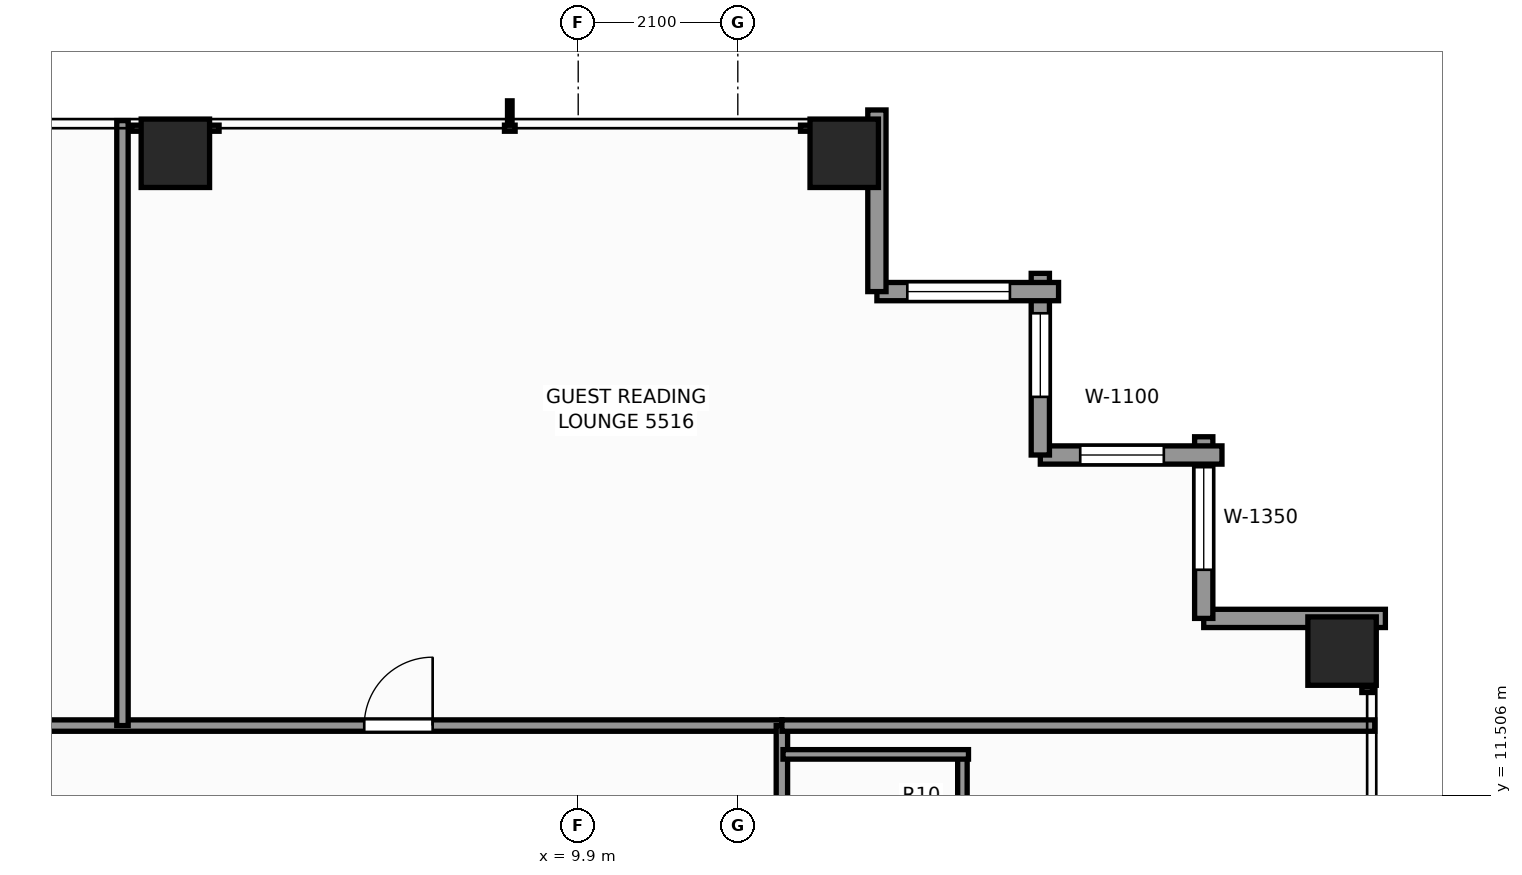
"""IFC4 building model, lengths in metres.
Left out: names, types, materials, properties, quantities, classifications, styles, units other than length and angle.
Written with IfcOpenShell. Run it as: python <this file> out.ifc"""

import sys

from ifc_helpers import new_model, si_unit, direction, frame, frame_2d, origin, origin_2d, place, context, subcontext, project, spatial, rectangle, extrude, element, fill, save


model = new_model("IFC4")
c1 = context("Model", 3, precision=1e-05, world=origin(), true_north=direction((0.0, 1.0)))
c2 = subcontext(c1, "Body", "Model", "MODEL_VIEW")
j1 = project(units=[si_unit("LENGTHUNIT", "METRE"), si_unit("PLANEANGLEUNIT", "RADIAN")], contexts=[c1])
p1 = place(None, origin())
s1 = spatial("IfcSite", under=j1, at=p1, CompositionType="ELEMENT")
p2 = place(p1, origin())
s2 = spatial("IfcBuilding", under=s1, at=p2, CompositionType="ELEMENT")
p3 = place(p2, frame((0.0, 0.0, 189.9)))
s3 = spatial("IfcBuildingStorey", under=s2, at=p3, CompositionType="ELEMENT", Elevation=189.9)
for number, where, z_axis, x_axis in (
    (1, (4.6, 19.95, 0.0), (0.0, 0.0, 1.0), (1.0, 0.0, 0.0)),
    (2, (13.4, 19.95, 0.0), (0.0, 0.0, 1.0), (1.0, 0.0, 0.0)),
    (3, (19.95, 13.4, 0.0), (0.0, 0.0, 1.0), (1.0, 0.0, 0.0)),
):
    element("IfcColumn", number, at=place(p3, frame(where, z_axis=z_axis, x_axis=x_axis)), inside=s3, PredefinedType="COLUMN", context=c2, shape_type="SweptSolid", body=[
        extrude(rectangle(XDim=0.9, YDim=0.9, at=origin_2d()), origin(), (0.0, 0.0, 1.0), 3.3),
    ])
p4 = place(p3, frame((18.13, 13.83, 0.0), z_axis=(0.0, 0.0, 1.0), x_axis=(1.0, 0.0, 0.0)))
e4 = element("IfcWall", 4, at=p4, inside=s3, PredefinedType="STANDARD", context=c2, shape_type="SweptSolid", body=[
    extrude(rectangle(XDim=2.39, YDim=0.24, at=frame_2d((1.195, 0.0))), origin(), (0.0, 0.0, 1.0), 2.463),
])
p5 = place(p3, frame((18.13, 16.22, 0.0), z_axis=(0.0, 0.0, 1.0), x_axis=(0.0, -1.0, 0.0)))
e5 = element("IfcWall", 5, at=p5, inside=s3, PredefinedType="STANDARD", context=c2, shape_type="SweptSolid", body=[
    extrude(rectangle(XDim=2.39, YDim=0.24, at=frame_2d((1.195, 0.0))), origin(), (0.0, 0.0, 1.0), 2.463),
])
p6 = place(p5, frame((0.4, 0.0, 0.65)))
e6 = element("IfcOpeningElement", 6, at=p6, cuts=e5, PredefinedType="OPENING", context=c2, shape_type="SweptSolid", body=[
    extrude(rectangle(XDim=1.35, YDim=1.55, at=frame_2d((0.675, 0.775))), frame((0.0, 0.13, 0.0), z_axis=(0.0, -1.0, 0.0), x_axis=(1.0, 0.0, 0.0)), (0.0, 0.0, 1.0), 0.26),
])
p7 = place(p3, frame((15.98, 15.98, 0.0), z_axis=(0.0, 0.0, 1.0), x_axis=(1.0, 0.0, 0.0)))
e7 = element("IfcWall", 7, at=p7, inside=s3, PredefinedType="STANDARD", context=c2, shape_type="SweptSolid", body=[
    extrude(rectangle(XDim=2.39, YDim=0.24, at=frame_2d((1.195, 0.0))), origin(), (0.0, 0.0, 1.0), 2.463),
])
p8 = place(p7, frame((0.525, 0.0, 0.65)))
e8 = element("IfcOpeningElement", 8, at=p8, cuts=e7, PredefinedType="OPENING", context=c2, shape_type="SweptSolid", body=[
    extrude(rectangle(XDim=1.1, YDim=1.45, at=frame_2d((0.55, 0.725))), frame((0.0, 0.13, 0.0), z_axis=(0.0, -1.0, 0.0), x_axis=(1.0, 0.0, 0.0)), (0.0, 0.0, 1.0), 0.26),
])
p9 = place(p3, frame((15.98, 18.37, 0.0), z_axis=(0.0, 0.0, 1.0), x_axis=(0.0, -1.0, 0.0)))
e9 = element("IfcWall", 9, at=p9, inside=s3, PredefinedType="STANDARD", context=c2, shape_type="SweptSolid", body=[
    extrude(rectangle(XDim=2.39, YDim=0.24, at=frame_2d((1.195, 0.0))), origin(), (0.0, 0.0, 1.0), 2.463),
])
p10 = place(p9, frame((0.525, 0.0, 0.65)))
e10 = element("IfcOpeningElement", 10, at=p10, cuts=e9, PredefinedType="OPENING", context=c2, shape_type="SweptSolid", body=[
    extrude(rectangle(XDim=1.1, YDim=1.45, at=frame_2d((0.55, 0.725))), frame((0.0, 0.13, 0.0), z_axis=(0.0, -1.0, 0.0), x_axis=(1.0, 0.0, 0.0)), (0.0, 0.0, 1.0), 0.26),
])
p11 = place(p3, frame((13.83, 18.13, 0.0), z_axis=(0.0, 0.0, 1.0), x_axis=(1.0, 0.0, 0.0)))
e11 = element("IfcWall", 11, at=p11, inside=s3, PredefinedType="STANDARD", context=c2, shape_type="SweptSolid", body=[
    extrude(rectangle(XDim=2.39, YDim=0.24, at=frame_2d((1.195, 0.0))), origin(), (0.0, 0.0, 1.0), 2.463),
])
p12 = place(p11, frame((0.4, 0.0, 0.65)))
e12 = element("IfcOpeningElement", 12, at=p12, cuts=e11, PredefinedType="OPENING", context=c2, shape_type="SweptSolid", body=[
    extrude(rectangle(XDim=1.35, YDim=1.55, at=frame_2d((0.675, 0.775))), frame((0.0, 0.13, 0.0), z_axis=(0.0, -1.0, 0.0), x_axis=(1.0, 0.0, 0.0)), (0.0, 0.0, 1.0), 0.26),
])
p13 = place(p3, frame((13.83, 20.52, 0.0), z_axis=(0.0, 0.0, 1.0), x_axis=(0.0, -1.0, 0.0)))
e13 = element("IfcWall", 13, at=p13, inside=s3, PredefinedType="STANDARD", context=c2, shape_type="SweptSolid", body=[
    extrude(rectangle(XDim=2.39, YDim=0.24, at=frame_2d((1.195, 0.0))), origin(), (0.0, 0.0, 1.0), 2.463),
])
p14 = place(p3, frame((-12.42, 12.42, 0.0), z_axis=(0.0, 0.0, 1.0), x_axis=(1.0, 0.0, 0.0)))
e14 = element("IfcWall", 14, at=p14, inside=s3, PredefinedType="PARTITIONING", context=c2, shape_type="SweptSolid", body=[
    extrude(rectangle(XDim=25.0, YDim=0.15, at=frame_2d((12.5, 0.0))), origin(), (0.0, 0.0, 1.0), 2.369),
])
p15 = place(p14, frame((4.435, 0.0, 0.0)))
e15 = element("IfcOpeningElement", 15, at=p15, cuts=e14, PredefinedType="OPENING", context=c2, shape_type="SweptSolid", body=[
    extrude(rectangle(XDim=0.9, YDim=2.06, at=frame_2d((0.45, 1.03))), frame((0.0, 0.085, 0.0), z_axis=(0.0, -1.0, 0.0), x_axis=(1.0, 0.0, 0.0)), (0.0, 0.0, 1.0), 0.17),
])
p16 = place(p14, frame((13.968, 0.0, 0.0)))
e16 = element("IfcOpeningElement", 16, at=p16, cuts=e14, PredefinedType="OPENING", context=c2, shape_type="SweptSolid", body=[
    extrude(rectangle(XDim=0.95, YDim=2.06, at=frame_2d((0.475, 1.03))), frame((0.0, 0.085, 0.0), z_axis=(0.0, -1.0, 0.0), x_axis=(1.0, 0.0, 0.0)), (0.0, 0.0, 1.0), 0.17),
])
p17 = place(p14, frame((19.505, 0.0, 0.0)))
e17 = element("IfcOpeningElement", 17, at=p17, cuts=e14, PredefinedType="OPENING", context=c2, shape_type="SweptSolid", body=[
    extrude(rectangle(XDim=0.9, YDim=2.06, at=frame_2d((0.45, 1.03))), frame((0.0, 0.085, 0.0), z_axis=(0.0, -1.0, 0.0), x_axis=(1.0, 0.0, 0.0)), (0.0, 0.0, 1.0), 0.17),
])
p18 = place(p3, frame((12.58, -12.42, 0.0), z_axis=(0.0, 0.0, 1.0), x_axis=(0.0, 1.0, 0.0)))
e18 = element("IfcWall", 18, at=p18, inside=s3, PredefinedType="PARTITIONING", context=c2, shape_type="SweptSolid", body=[
    extrude(rectangle(XDim=24.84, YDim=0.15, at=frame_2d((12.42, 0.0))), origin(), (0.0, 0.0, 1.0), 2.369),
])
p19 = place(p18, frame((3.581, 0.0, 0.0)))
e19 = element("IfcOpeningElement", 19, at=p19, cuts=e18, PredefinedType="OPENING", context=c2, shape_type="SweptSolid", body=[
    extrude(rectangle(XDim=0.95, YDim=2.06, at=frame_2d((0.475, 1.03))), frame((0.0, 0.085, 0.0), z_axis=(0.0, -1.0, 0.0), x_axis=(1.0, 0.0, 0.0)), (0.0, 0.0, 1.0), 0.17),
])
p20 = place(p18, frame((5.877, 0.0, 0.0)))
e20 = element("IfcOpeningElement", 20, at=p20, cuts=e18, PredefinedType="OPENING", context=c2, shape_type="SweptSolid", body=[
    extrude(rectangle(XDim=0.9, YDim=2.06, at=frame_2d((0.45, 1.03))), frame((0.0, 0.085, 0.0), z_axis=(0.0, -1.0, 0.0), x_axis=(1.0, 0.0, 0.0)), (0.0, 0.0, 1.0), 0.17),
])
p21 = place(p18, frame((13.975, 0.0, 0.0)))
e21 = element("IfcOpeningElement", 21, at=p21, cuts=e18, PredefinedType="OPENING", context=c2, shape_type="SweptSolid", body=[
    extrude(rectangle(XDim=0.95, YDim=2.06, at=frame_2d((0.475, 1.03))), frame((0.0, 0.085, 0.0), z_axis=(0.0, -1.0, 0.0), x_axis=(1.0, 0.0, 0.0)), (0.0, 0.0, 1.0), 0.17),
])
p22 = place(p18, frame((18.581, 0.0, 0.0)))
e22 = element("IfcOpeningElement", 22, at=p22, cuts=e18, PredefinedType="OPENING", context=c2, shape_type="SweptSolid", body=[
    extrude(rectangle(XDim=0.9, YDim=2.06, at=frame_2d((0.45, 1.03))), frame((0.0, 0.085, 0.0), z_axis=(0.0, -1.0, 0.0), x_axis=(1.0, 0.0, 0.0)), (0.0, 0.0, 1.0), 0.17),
])
p23 = place(p18, frame((20.826, 0.0, 0.0)))
e23 = element("IfcOpeningElement", 23, at=p23, cuts=e18, PredefinedType="OPENING", context=c2, shape_type="SweptSolid", body=[
    extrude(rectangle(XDim=0.95, YDim=2.06, at=frame_2d((0.475, 1.03))), frame((0.0, 0.085, 0.0), z_axis=(0.0, -1.0, 0.0), x_axis=(1.0, 0.0, 0.0)), (0.0, 0.0, 1.0), 0.17),
])
p24 = place(p3, frame((12.58, 12.42, 0.0), z_axis=(0.0, 0.0, 1.0), x_axis=(1.0, 0.0, 0.0)))
e24 = element("IfcWall", 24, at=p24, inside=s3, PredefinedType="PARTITIONING", context=c2, shape_type="SweptSolid", body=[
    extrude(rectangle(XDim=7.8, YDim=0.15, at=frame_2d((3.9, 0.0))), origin(), (0.0, 0.0, 1.0), 2.369),
])
p25 = place(p3, frame((14.955, 9.831, 0.0), z_axis=(0.0, 0.0, 1.0), x_axis=(0.0, 1.0, 0.0)))
e25 = element("IfcWall", 25, at=p25, inside=s3, PredefinedType="PARTITIONING", context=c2, shape_type="SweptSolid", body=[
    extrude(rectangle(XDim=2.27, YDim=0.125, at=frame_2d((1.135, 0.0))), origin(), (0.0, 0.0, 1.0), 2.369),
])
p26 = place(p3, frame((12.595, 12.041, 0.0), z_axis=(0.0, 0.0, 1.0), x_axis=(1.0, 0.0, 0.0)))
e26 = element("IfcWall", 26, at=p26, inside=s3, PredefinedType="PARTITIONING", context=c2, shape_type="SweptSolid", body=[
    extrude(rectangle(XDim=2.44, YDim=0.125, at=frame_2d((1.22, 0.0))), origin(), (0.0, 0.0, 1.0), 3.08),
])
p27 = place(p3, frame((3.904, 12.42, 0.0), z_axis=(0.0, 0.0, 1.0), x_axis=(0.0, 1.0, 0.0)))
e27 = element("IfcWall", 27, at=p27, inside=s3, PredefinedType="PARTITIONING", context=c2, shape_type="SweptSolid", body=[
    extrude(rectangle(XDim=7.96, YDim=0.15, at=frame_2d((3.98, 0.0))), origin(), (0.0, 0.0, 1.0), 2.453),
])
p28 = place(p6, origin())
e28 = element("IfcWindow", 28, at=p28, inside=s3, PartitioningType="SINGLE_PANEL", PredefinedType="WINDOW", context=c2, shape_type="SweptSolid", body=[
    extrude(rectangle(XDim=1.35, YDim=1.55, at=frame_2d((0.675, 0.775))), frame((0.0, 0.03, 0.0), z_axis=(0.0, -1.0, 0.0), x_axis=(1.0, 0.0, 0.0)), (0.0, 0.0, 1.0), 0.06),
])
fill(e6, e28)
p29 = place(p8, origin())
e29 = element("IfcWindow", 29, at=p29, inside=s3, PartitioningType="SINGLE_PANEL", PredefinedType="WINDOW", context=c2, shape_type="SweptSolid", body=[
    extrude(rectangle(XDim=1.1, YDim=1.45, at=frame_2d((0.55, 0.725))), frame((0.0, 0.03, 0.0), z_axis=(0.0, -1.0, 0.0), x_axis=(1.0, 0.0, 0.0)), (0.0, 0.0, 1.0), 0.06),
])
fill(e8, e29)
p30 = place(p10, origin())
e30 = element("IfcWindow", 30, at=p30, inside=s3, PartitioningType="SINGLE_PANEL", PredefinedType="WINDOW", context=c2, shape_type="SweptSolid", body=[
    extrude(rectangle(XDim=1.1, YDim=1.45, at=frame_2d((0.55, 0.725))), frame((0.0, 0.03, 0.0), z_axis=(0.0, -1.0, 0.0), x_axis=(1.0, 0.0, 0.0)), (0.0, 0.0, 1.0), 0.06),
])
fill(e10, e30)
p31 = place(p12, origin())
e31 = element("IfcWindow", 31, at=p31, inside=s3, PartitioningType="SINGLE_PANEL", PredefinedType="WINDOW", context=c2, shape_type="SweptSolid", body=[
    extrude(rectangle(XDim=1.35, YDim=1.55, at=frame_2d((0.675, 0.775))), frame((0.0, 0.03, 0.0), z_axis=(0.0, -1.0, 0.0), x_axis=(1.0, 0.0, 0.0)), (0.0, 0.0, 1.0), 0.06),
])
fill(e12, e31)
p32 = place(p17, origin())
e32 = element("IfcDoor", 32, at=p32, inside=s3, OperationType="SINGLE_SWING_RIGHT", PredefinedType="DOOR", context=c2, shape_type="SweptSolid", body=[
    extrude(rectangle(XDim=0.9, YDim=2.06, at=frame_2d((0.45, 1.03))), frame((0.0, 0.025, 0.0), z_axis=(0.0, -1.0, 0.0), x_axis=(1.0, 0.0, 0.0)), (0.0, 0.0, 1.0), 0.05),
])
fill(e17, e32)
save(model, sys.argv[1])
